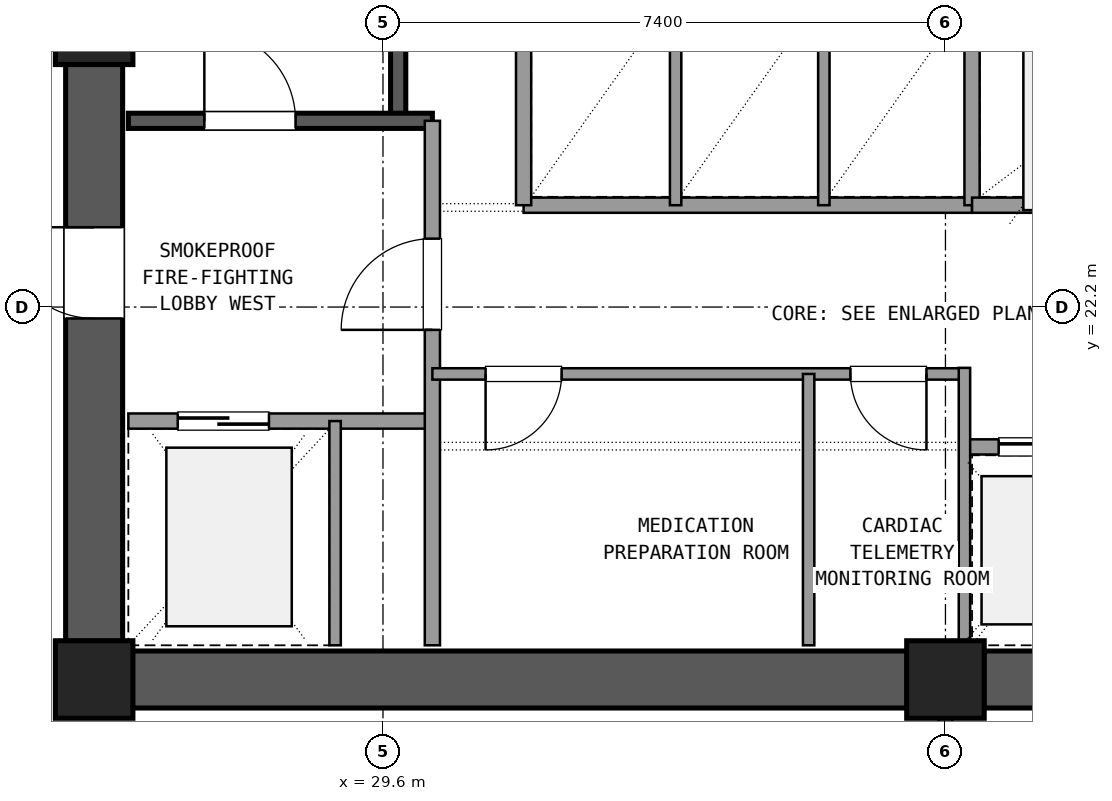
"""IFC4 building model, lengths in metres.
Left out: names, types, materials, properties, quantities, classifications, styles, units other than length and angle.
Written with IfcOpenShell. Run it as: python <this file> out.ifc"""

import sys

from ifc_helpers import new_model, si_unit, direction, frame, frame_2d, origin, origin_2d, place, context, subcontext, project, spatial, rectangle, extrude, element, fill, save


model = new_model("IFC4")
c1 = context("Model", 3, precision=1e-05, world=origin(), true_north=direction((0.0, 1.0)))
c2 = subcontext(c1, "Body", "Model", "MODEL_VIEW")
j1 = project(units=[si_unit("LENGTHUNIT", "METRE"), si_unit("PLANEANGLEUNIT", "RADIAN")], contexts=[c1])
p1 = place(None, origin())
s1 = spatial("IfcSite", under=j1, at=p1, CompositionType="ELEMENT")
p2 = place(p1, origin())
s2 = spatial("IfcBuilding", under=s1, at=p2, CompositionType="ELEMENT")
p3 = place(p2, frame((0.0, 0.0, 91.98)))
s3 = spatial("IfcBuildingStorey", under=s2, at=p3, CompositionType="ELEMENT", Elevation=91.98)
for number, where, z_axis, x_axis in (
    (1, (25.8, 17.3, 0.0), (0.0, 0.0, 1.0), (1.0, 0.0, 0.0)),
    (2, (37.0, 17.3, 0.0), (0.0, 0.0, 1.0), (1.0, 0.0, 0.0)),
    (3, (25.8, 25.9, 0.0), (0.0, 0.0, 1.0), (1.0, 0.0, 0.0)),
):
    element("IfcColumn", number, at=place(p3, frame(where, z_axis=z_axis, x_axis=x_axis)), inside=s3, PredefinedType="COLUMN", context=c2, shape_type="SweptSolid", body=[
        extrude(rectangle(XDim=1.02, YDim=1.02, at=origin_2d()), origin(), (0.0, 0.0, 1.0), 3.6),
    ])
for number, where, z_axis, x_axis in (
    (4, (26.305, 17.3, 0.0), (0.0, 0.0, 1.0), (1.0, 0.0, 0.0)),
    (5, (37.505, 17.3, 0.0), (0.0, 0.0, 1.0), (1.0, 0.0, 0.0)),
):
    element("IfcWall", number, at=place(p3, frame(where, z_axis=z_axis, x_axis=x_axis)), inside=s3, PredefinedType="SHEAR", context=c2, shape_type="SweptSolid", body=[
        extrude(rectangle(XDim=10.19, YDim=0.75, at=frame_2d((5.095, 0.0))), origin(), (0.0, 0.0, 1.0), 3.32),
    ])
p4 = place(p3, frame((25.8, 25.395, 0.0), z_axis=(0.0, 0.0, 1.0), x_axis=(0.0, -1.0, 0.0)))
e6 = element("IfcWall", 6, at=p4, inside=s3, PredefinedType="SHEAR", context=c2, shape_type="SweptSolid", body=[
    extrude(rectangle(XDim=7.59, YDim=0.75, at=frame_2d((3.795, 0.0))), origin(), (0.0, 0.0, 1.0), 3.32),
])
p5 = place(p4, frame((2.145, 0.0, 0.0)))
e7 = element("IfcOpeningElement", 7, at=p5, cuts=e6, PredefinedType="OPENING", context=c2, shape_type="SweptSolid", body=[
    extrude(rectangle(XDim=1.2, YDim=2.15, at=frame_2d((0.6, 1.075))), frame((0.0, 0.385, 0.0), z_axis=(0.0, -1.0, 0.0), x_axis=(1.0, 0.0, 0.0)), (0.0, 0.0, 1.0), 0.77),
])
p6 = place(p3, frame((29.8, 24.65, 0.0), z_axis=(0.0, 0.0, 1.0), x_axis=(0.0, 1.0, 0.0)))
e8 = element("IfcWall", 8, at=p6, inside=s3, PredefinedType="SHEAR", context=c2, shape_type="SweptSolid", body=[
    extrude(rectangle(XDim=9.4, YDim=0.2, at=frame_2d((4.7, 0.0))), origin(), (0.0, 0.0, 1.0), 3.32),
])
p7 = place(p3, frame((26.25, 24.65, 0.0), z_axis=(0.0, 0.0, 1.0), x_axis=(1.0, 0.0, 0.0)))
e9 = element("IfcWall", 9, at=p7, inside=s3, PredefinedType="SHEAR", context=c2, shape_type="SweptSolid", body=[
    extrude(rectangle(XDim=4.0, YDim=0.2, at=frame_2d((2.0, 0.0))), origin(), (0.0, 0.0, 1.0), 3.32),
])
p8 = place(p7, frame((1.0, 0.0, 0.0)))
e10 = element("IfcOpeningElement", 10, at=p8, cuts=e9, PredefinedType="OPENING", context=c2, shape_type="SweptSolid", body=[
    extrude(rectangle(XDim=1.2, YDim=2.15, at=frame_2d((0.6, 1.075))), frame((0.0, 0.11, 0.0), z_axis=(0.0, -1.0, 0.0), x_axis=(1.0, 0.0, 0.0)), (0.0, 0.0, 1.0), 0.22),
])
p9 = place(p3, frame((26.25, 20.7, 0.0), z_axis=(0.0, 0.0, 1.0), x_axis=(1.0, 0.0, 0.0)))
e11 = element("IfcWall", 11, at=p9, inside=s3, PredefinedType="SOLIDWALL", context=c2, shape_type="SweptSolid", body=[
    extrude(rectangle(XDim=4.0, YDim=0.2, at=frame_2d((2.0, 0.0))), origin(), (0.0, 0.0, 1.0), 2.61),
])
p10 = place(p9, frame((0.65, 0.0, 0.0)))
e12 = element("IfcOpeningElement", 12, at=p10, cuts=e11, PredefinedType="OPENING", context=c2, shape_type="SweptSolid", body=[
    extrude(rectangle(XDim=1.2, YDim=2.15, at=frame_2d((0.6, 1.075))), frame((0.0, 0.11, 0.0), z_axis=(0.0, -1.0, 0.0), x_axis=(1.0, 0.0, 0.0)), (0.0, 0.0, 1.0), 0.22),
])
p11 = place(p3, frame((30.25, 17.75, 0.0), z_axis=(0.0, 0.0, 1.0), x_axis=(0.0, 1.0, 0.0)))
e13 = element("IfcWall", 13, at=p11, inside=s3, PredefinedType="SOLIDWALL", context=c2, shape_type="SweptSolid", body=[
    extrude(rectangle(XDim=6.9, YDim=0.2, at=frame_2d((3.45, 0.0))), origin(), (0.0, 0.0, 1.0), 2.61),
])
p12 = place(p11, frame((4.15, 0.0, 0.0)))
e14 = element("IfcOpeningElement", 14, at=p12, cuts=e13, PredefinedType="OPENING", context=c2, shape_type="SweptSolid", body=[
    extrude(rectangle(XDim=1.2, YDim=2.15, at=frame_2d((0.6, 1.075))), frame((0.0, 0.11, 0.0), z_axis=(0.0, -1.0, 0.0), x_axis=(1.0, 0.0, 0.0)), (0.0, 0.0, 1.0), 0.22),
])
p13 = place(p3, frame((28.97, 17.75, 0.0), z_axis=(0.0, 0.0, 1.0), x_axis=(0.0, 1.0, 0.0)))
e15 = element("IfcWall", 15, at=p13, inside=s3, PredefinedType="PARTITIONING", context=c2, shape_type="SweptSolid", body=[
    extrude(rectangle(XDim=2.95, YDim=0.15, at=frame_2d((1.475, 0.0))), origin(), (0.0, 0.0, 1.0), 2.61),
])
p14 = place(p3, frame((30.25, 21.32, 0.0), z_axis=(0.0, 0.0, 1.0), x_axis=(1.0, 0.0, 0.0)))
e16 = element("IfcWall", 16, at=p14, inside=s3, PredefinedType="PARTITIONING", context=c2, shape_type="SweptSolid", body=[
    extrude(rectangle(XDim=7.0, YDim=0.15, at=frame_2d((3.5, 0.0))), origin(), (0.0, 0.0, 1.0), 2.61),
])
p15 = place(p14, frame((0.7, 0.0, 0.0)))
e17 = element("IfcOpeningElement", 17, at=p15, cuts=e16, PredefinedType="OPENING", context=c2, shape_type="SweptSolid", body=[
    extrude(rectangle(XDim=1.0, YDim=2.15, at=frame_2d((0.5, 1.075))), frame((0.0, 0.085, 0.0), z_axis=(0.0, -1.0, 0.0), x_axis=(1.0, 0.0, 0.0)), (0.0, 0.0, 1.0), 0.17),
])
p16 = place(p14, frame((5.5, 0.0, 0.0)))
e18 = element("IfcOpeningElement", 18, at=p16, cuts=e16, PredefinedType="OPENING", context=c2, shape_type="SweptSolid", body=[
    extrude(rectangle(XDim=1.0, YDim=2.15, at=frame_2d((0.5, 1.075))), frame((0.0, 0.085, 0.0), z_axis=(0.0, -1.0, 0.0), x_axis=(1.0, 0.0, 0.0)), (0.0, 0.0, 1.0), 0.17),
])
p17 = place(p3, frame((35.2, 17.75, 0.0), z_axis=(0.0, 0.0, 1.0), x_axis=(0.0, 1.0, 0.0)))
e19 = element("IfcWall", 19, at=p17, inside=s3, PredefinedType="PARTITIONING", context=c2, shape_type="SweptSolid", body=[
    extrude(rectangle(XDim=3.57, YDim=0.15, at=frame_2d((1.785, 0.0))), origin(), (0.0, 0.0, 1.0), 2.61),
])
p18 = place(p3, frame((37.25, 20.36, 0.0), z_axis=(0.0, 0.0, 1.0), x_axis=(1.0, 0.0, 0.0)))
e20 = element("IfcWall", 20, at=p18, inside=s3, PredefinedType="SOLIDWALL", context=c2, shape_type="SweptSolid", body=[
    extrude(rectangle(XDim=6.1, YDim=0.2, at=frame_2d((3.05, 0.0))), origin(), (0.0, 0.0, 1.0), 2.61),
])
p19 = place(p18, frame((0.45, 0.0, 0.0)))
e21 = element("IfcOpeningElement", 21, at=p19, cuts=e20, PredefinedType="OPENING", context=c2, shape_type="SweptSolid", body=[
    extrude(rectangle(XDim=1.1, YDim=2.15, at=frame_2d((0.55, 1.075))), frame((0.0, 0.11, 0.0), z_axis=(0.0, -1.0, 0.0), x_axis=(1.0, 0.0, 0.0)), (0.0, 0.0, 1.0), 0.22),
])
p20 = place(p18, frame((2.5, 0.0, 0.0)))
e22 = element("IfcOpeningElement", 22, at=p20, cuts=e20, PredefinedType="OPENING", context=c2, shape_type="SweptSolid", body=[
    extrude(rectangle(XDim=1.1, YDim=2.15, at=frame_2d((0.55, 1.075))), frame((0.0, 0.11, 0.0), z_axis=(0.0, -1.0, 0.0), x_axis=(1.0, 0.0, 0.0)), (0.0, 0.0, 1.0), 0.22),
])
p21 = place(p18, frame((4.55, 0.0, 0.0)))
e23 = element("IfcOpeningElement", 23, at=p21, cuts=e20, PredefinedType="OPENING", context=c2, shape_type="SweptSolid", body=[
    extrude(rectangle(XDim=1.1, YDim=2.15, at=frame_2d((0.55, 1.075))), frame((0.0, 0.11, 0.0), z_axis=(0.0, -1.0, 0.0), x_axis=(1.0, 0.0, 0.0)), (0.0, 0.0, 1.0), 0.22),
])
p22 = place(p3, frame((37.25, 17.75, 0.0), z_axis=(0.0, 0.0, 1.0), x_axis=(0.0, 1.0, 0.0)))
e24 = element("IfcWall", 24, at=p22, inside=s3, PredefinedType="PARTITIONING", context=c2, shape_type="SweptSolid", body=[
    extrude(rectangle(XDim=3.65, YDim=0.15, at=frame_2d((1.825, 0.0))), origin(), (0.0, 0.0, 1.0), 2.61),
])
p23 = place(p3, frame((31.45, 23.54, 0.0), z_axis=(0.0, 0.0, 1.0), x_axis=(1.0, 0.0, 0.0)))
e25 = element("IfcWall", 25, at=p23, inside=s3, PredefinedType="SOLIDWALL", context=c2, shape_type="SweptSolid", body=[
    extrude(rectangle(XDim=5.9, YDim=0.2, at=frame_2d((2.95, 0.0))), origin(), (0.0, 0.0, 1.0), 2.61),
])
p24 = place(p3, frame((31.45, 23.54, 0.0), z_axis=(0.0, 0.0, 1.0), x_axis=(0.0, 1.0, 0.0)))
e26 = element("IfcWall", 26, at=p24, inside=s3, PredefinedType="SOLIDWALL", context=c2, shape_type="SweptSolid", body=[
    extrude(rectangle(XDim=2.81, YDim=0.2, at=frame_2d((1.405, 0.0))), origin(), (0.0, 0.0, 1.0), 2.61),
])
for number, where, z_axis, x_axis in (
    (27, (33.45, 23.54, 0.0), (0.0, 0.0, 1.0), (0.0, 1.0, 0.0)),
    (28, (35.4, 23.54, 0.0), (0.0, 0.0, 1.0), (0.0, 1.0, 0.0)),
):
    element("IfcWall", number, at=place(p3, frame(where, z_axis=z_axis, x_axis=x_axis)), inside=s3, PredefinedType="PARTITIONING", context=c2, shape_type="SweptSolid", body=[
        extrude(rectangle(XDim=2.81, YDim=0.15, at=frame_2d((1.405, 0.0))), origin(), (0.0, 0.0, 1.0), 2.61),
    ])
p25 = place(p3, frame((37.35, 23.54, 0.0), z_axis=(0.0, 0.0, 1.0), x_axis=(0.0, 1.0, 0.0)))
e29 = element("IfcWall", 29, at=p25, inside=s3, PredefinedType="SOLIDWALL", context=c2, shape_type="SweptSolid", body=[
    extrude(rectangle(XDim=6.82, YDim=0.2, at=frame_2d((3.41, 0.0))), origin(), (0.0, 0.0, 1.0), 2.61),
])
p26 = place(p3, frame((37.35, 23.54, 0.0), z_axis=(0.0, 0.0, 1.0), x_axis=(1.0, 0.0, 0.0)))
e30 = element("IfcWall", 30, at=p26, inside=s3, PredefinedType="SOLIDWALL", context=c2, shape_type="SweptSolid", body=[
    extrude(rectangle(XDim=3.05, YDim=0.2, at=frame_2d((1.525, 0.0))), origin(), (0.0, 0.0, 1.0), 2.61),
])
p27 = place(p3, frame((37.0, 13.64, 0.0), z_axis=(0.0, 0.0, 1.0), x_axis=(0.0, 1.0, 0.0)))
e31 = element("IfcWall", 31, at=p27, inside=s3, PredefinedType="PARTITIONING", context=c2, shape_type="SweptSolid", body=[
    extrude(rectangle(XDim=3.21, YDim=0.18, at=frame_2d((1.605, 0.0))), origin(), (0.0, 0.0, 1.0), 2.61),
])
p28 = place(p27, frame((0.605, 0.0, 0.0)))
e32 = element("IfcOpeningElement", 32, at=p28, cuts=e31, PredefinedType="OPENING", context=c2, shape_type="SweptSolid", body=[
    extrude(rectangle(XDim=2.0, YDim=2.2, at=frame_2d((1.0, 1.1))), frame((0.0, 0.1, 0.0), z_axis=(0.0, -1.0, 0.0), x_axis=(1.0, 0.0, 0.0)), (0.0, 0.0, 1.0), 0.2),
])
p29 = place(p8, origin())
e33 = element("IfcDoor", 33, at=p29, inside=s3, OperationType="SINGLE_SWING_LEFT", PredefinedType="DOOR", context=c2, shape_type="SweptSolid", body=[
    extrude(rectangle(XDim=1.2, YDim=2.15, at=frame_2d((0.6, 1.075))), frame((0.0, 0.025, 0.0), z_axis=(0.0, -1.0, 0.0), x_axis=(1.0, 0.0, 0.0)), (0.0, 0.0, 1.0), 0.05),
])
fill(e10, e33)
p30 = place(p10, origin())
e34 = element("IfcDoor", 34, at=p30, inside=s3, OperationType="SLIDING_TO_LEFT", PredefinedType="DOOR", context=c2, shape_type="SweptSolid", body=[
    extrude(rectangle(XDim=1.2, YDim=2.15, at=frame_2d((0.6, 1.075))), frame((0.0, 0.025, 0.0), z_axis=(0.0, -1.0, 0.0), x_axis=(1.0, 0.0, 0.0)), (0.0, 0.0, 1.0), 0.05),
])
fill(e12, e34)
p31 = place(p12, origin())
e35 = element("IfcDoor", 35, at=p31, inside=s3, OperationType="SINGLE_SWING_LEFT", PredefinedType="DOOR", context=c2, shape_type="SweptSolid", body=[
    extrude(rectangle(XDim=1.2, YDim=2.15, at=frame_2d((0.6, 1.075))), frame((0.0, 0.025, 0.0), z_axis=(0.0, -1.0, 0.0), x_axis=(1.0, 0.0, 0.0)), (0.0, 0.0, 1.0), 0.05),
])
fill(e14, e35)
p32 = place(p5, frame((1.2, 0.0, 0.0), z_axis=(0.0, 0.0, 1.0), x_axis=(-1.0, 0.0, 0.0)))
e36 = element("IfcDoor", 36, at=p32, inside=s3, OperationType="SINGLE_SWING_LEFT", PredefinedType="DOOR", context=c2, shape_type="SweptSolid", body=[
    extrude(rectangle(XDim=1.2, YDim=2.15, at=frame_2d((0.6, 1.075))), frame((0.0, 0.025, 0.0), z_axis=(0.0, -1.0, 0.0), x_axis=(1.0, 0.0, 0.0)), (0.0, 0.0, 1.0), 0.05),
])
fill(e7, e36)
p33 = place(p15, frame((1.0, 0.0, 0.0), z_axis=(0.0, 0.0, 1.0), x_axis=(-1.0, 0.0, 0.0)))
e37 = element("IfcDoor", 37, at=p33, inside=s3, OperationType="SINGLE_SWING_LEFT", PredefinedType="DOOR", context=c2, shape_type="SweptSolid", body=[
    extrude(rectangle(XDim=1.0, YDim=2.15, at=frame_2d((0.5, 1.075))), frame((0.0, 0.025, 0.0), z_axis=(0.0, -1.0, 0.0), x_axis=(1.0, 0.0, 0.0)), (0.0, 0.0, 1.0), 0.05),
])
fill(e17, e37)
p34 = place(p16, frame((1.0, 0.0, 0.0), z_axis=(0.0, 0.0, 1.0), x_axis=(-1.0, 0.0, 0.0)))
e38 = element("IfcDoor", 38, at=p34, inside=s3, OperationType="SINGLE_SWING_RIGHT", PredefinedType="DOOR", context=c2, shape_type="SweptSolid", body=[
    extrude(rectangle(XDim=1.0, YDim=2.15, at=frame_2d((0.5, 1.075))), frame((0.0, 0.025, 0.0), z_axis=(0.0, -1.0, 0.0), x_axis=(1.0, 0.0, 0.0)), (0.0, 0.0, 1.0), 0.05),
])
fill(e18, e38)
p35 = place(p19, origin())
e39 = element("IfcDoor", 39, at=p35, inside=s3, OperationType="SLIDING_TO_LEFT", PredefinedType="DOOR", context=c2, shape_type="SweptSolid", body=[
    extrude(rectangle(XDim=1.1, YDim=2.15, at=frame_2d((0.55, 1.075))), frame((0.0, 0.025, 0.0), z_axis=(0.0, -1.0, 0.0), x_axis=(1.0, 0.0, 0.0)), (0.0, 0.0, 1.0), 0.05),
])
fill(e21, e39)
save(model, sys.argv[1])
